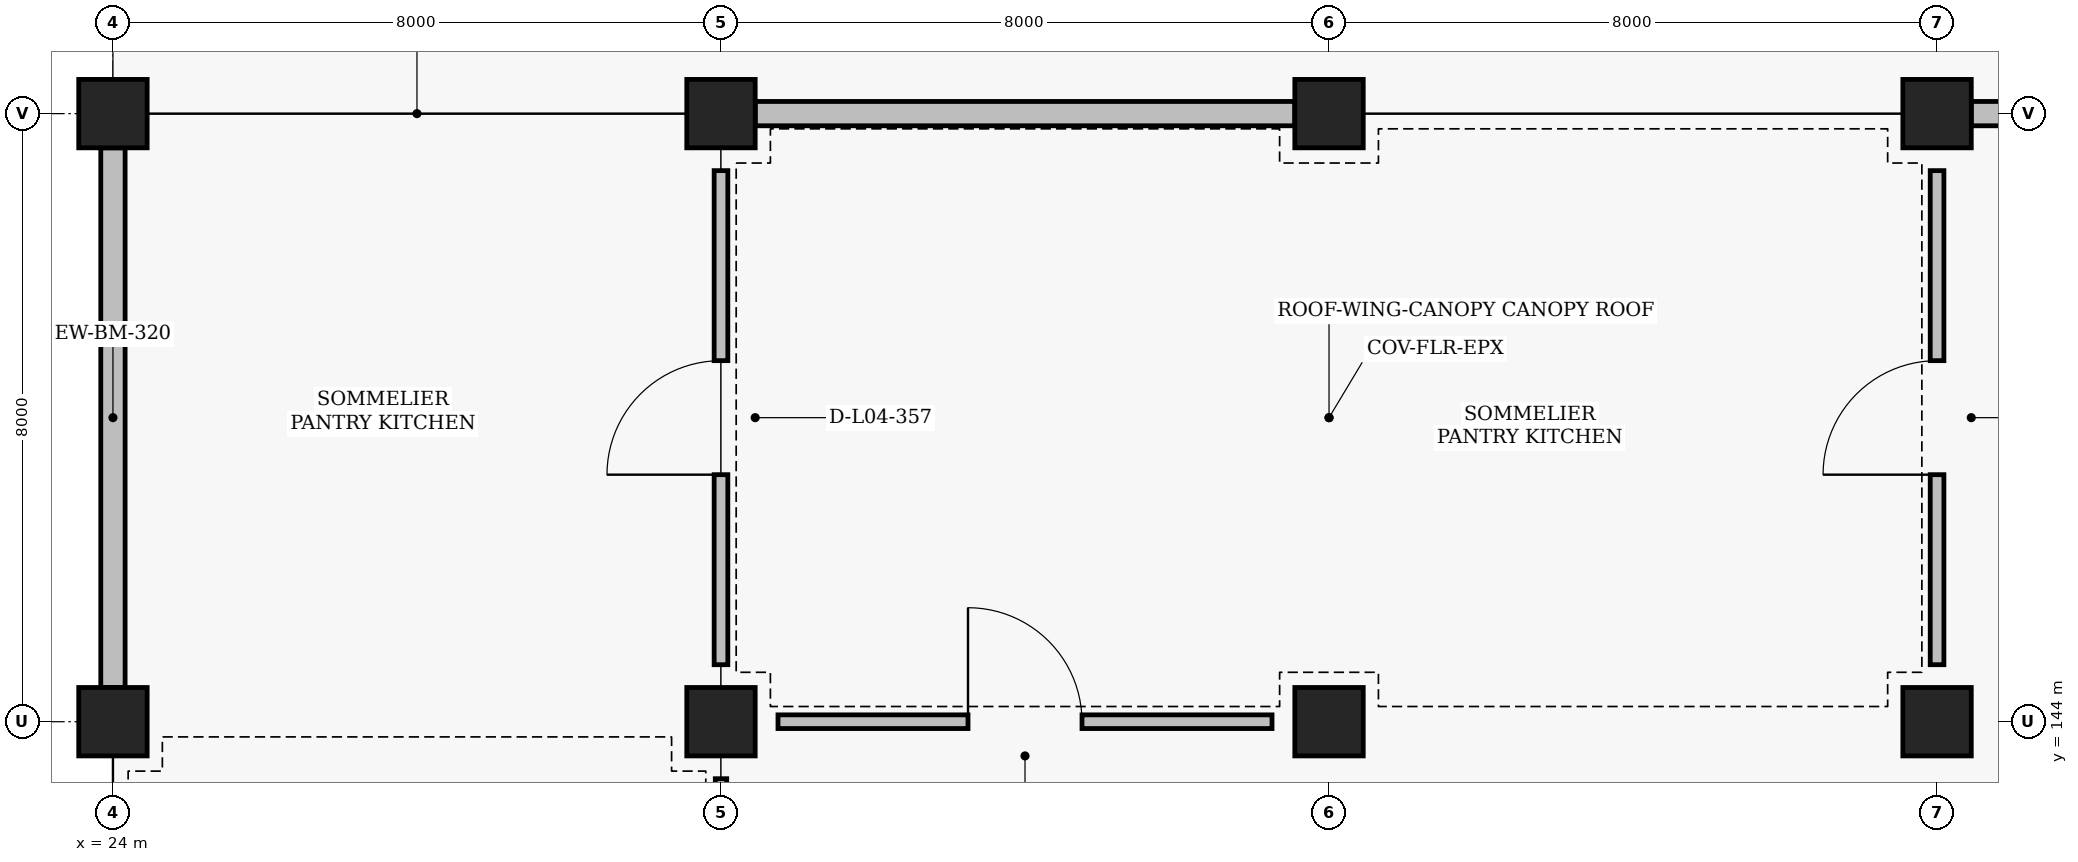
"""IFC4 building model, lengths in metres.
Left out: names, types, materials, properties, quantities, classifications, styles, units other than length and angle.
Written with IfcOpenShell. Run it as: python <this file> out.ifc"""

import sys

from ifc_helpers import new_model, si_unit, direction, frame, frame_2d, origin, origin_2d, place, context, subcontext, project, spatial, rectangle, extrude, element, fill, save


model = new_model("IFC4")
c1 = context("Model", 3, precision=1e-05, world=origin(), true_north=direction((0.0, 1.0)))
c2 = subcontext(c1, "Body", "Model", "MODEL_VIEW")
j1 = project(units=[si_unit("LENGTHUNIT", "METRE"), si_unit("PLANEANGLEUNIT", "RADIAN")], contexts=[c1])
p1 = place(None, origin())
s1 = spatial("IfcSite", under=j1, at=p1, CompositionType="ELEMENT")
p2 = place(p1, origin())
s2 = spatial("IfcBuilding", under=s1, at=p2, CompositionType="ELEMENT")
p3 = place(p2, frame((0.0, 0.0, 14.4)))
s3 = spatial("IfcBuildingStorey", under=s2, at=p3, CompositionType="ELEMENT", Elevation=14.4)
for number, where, z_axis, x_axis in (
    (1, (24.0, 144.0, 0.0), (0.0, 0.0, 1.0), (1.0, 0.0, 0.0)),
    (2, (24.0, 152.0, 0.0), (0.0, 0.0, 1.0), (1.0, 0.0, 0.0)),
    (3, (32.0, 144.0, 0.0), (0.0, 0.0, 1.0), (1.0, 0.0, 0.0)),
    (4, (32.0, 152.0, 0.0), (0.0, 0.0, 1.0), (1.0, 0.0, 0.0)),
    (5, (40.0, 144.0, 0.0), (0.0, 0.0, 1.0), (1.0, 0.0, 0.0)),
    (6, (40.0, 152.0, 0.0), (0.0, 0.0, 1.0), (1.0, 0.0, 0.0)),
    (7, (48.0, 144.0, 0.0), (0.0, 0.0, 1.0), (1.0, 0.0, 0.0)),
    (8, (48.0, 152.0, 0.0), (0.0, 0.0, 1.0), (1.0, 0.0, 0.0)),
):
    element("IfcColumn", number, at=place(p3, frame(where, z_axis=z_axis, x_axis=x_axis)), inside=s3, PredefinedType="COLUMN", context=c2, shape_type="SweptSolid", body=[
        extrude(rectangle(XDim=0.9, YDim=0.9, at=origin_2d()), origin(), (0.0, 0.0, 1.0), 4.2),
    ])
p4 = place(p3, frame((24.0, 144.45, 0.0), z_axis=(0.0, 0.0, 1.0), x_axis=(0.0, 1.0, 0.0)))
e9 = element("IfcWall", 9, at=p4, inside=s3, PredefinedType="SOLIDWALL", context=c2, shape_type="SweptSolid", body=[
    extrude(rectangle(XDim=7.1, YDim=0.32, at=frame_2d((3.55, 0.0))), origin(), (0.0, 0.0, 1.0), 3.33),
])
for number, where, z_axis, x_axis in (
    (10, (32.45, 152.0, 0.0), (0.0, 0.0, 1.0), (1.0, 0.0, 0.0)),
    (11, (48.45, 152.0, 0.0), (0.0, 0.0, 1.0), (1.0, 0.0, 0.0)),
):
    element("IfcWall", number, at=place(p3, frame(where, z_axis=z_axis, x_axis=x_axis)), inside=s3, PredefinedType="SOLIDWALL", context=c2, shape_type="SweptSolid", body=[
        extrude(rectangle(XDim=7.1, YDim=0.32, at=frame_2d((3.55, 0.0))), origin(), (0.0, 0.0, 1.0), 3.35),
    ])
p5 = place(p3, frame((32.0, 144.75, 0.0), z_axis=(0.0, 0.0, 1.0), x_axis=(0.0, 1.0, 0.0)))
e12 = element("IfcWall", 12, at=p5, inside=s3, PredefinedType="PARTITIONING", context=c2, shape_type="SweptSolid", body=[
    extrude(rectangle(XDim=6.5, YDim=0.18, at=frame_2d((3.25, 0.0))), origin(), (0.0, 0.0, 1.0), 3.37),
])
p6 = place(p5, frame((2.5, 0.0, 0.0)))
e13 = element("IfcOpeningElement", 13, at=p6, cuts=e12, PredefinedType="OPENING", context=c2, shape_type="SweptSolid", body=[
    extrude(rectangle(XDim=1.5, YDim=2.2, at=frame_2d((0.75, 1.1))), frame((0.0, 0.1, 0.0), z_axis=(0.0, -1.0, 0.0), x_axis=(1.0, 0.0, 0.0)), (0.0, 0.0, 1.0), 0.2),
])
p7 = place(p3, frame((32.0, 136.75, 0.0), z_axis=(0.0, 0.0, 1.0), x_axis=(0.0, 1.0, 0.0)))
e14 = element("IfcWall", 14, at=p7, inside=s3, PredefinedType="PARTITIONING", context=c2, shape_type="SweptSolid", body=[
    extrude(rectangle(XDim=6.5, YDim=0.15, at=frame_2d((3.25, 0.0))), origin(), (0.0, 0.0, 1.0), 3.33),
])
p8 = place(p7, frame((2.15, 0.0, 0.0)))
e15 = element("IfcOpeningElement", 15, at=p8, cuts=e14, PredefinedType="OPENING", context=c2, shape_type="SweptSolid", body=[
    extrude(rectangle(XDim=2.2, YDim=2.4, at=frame_2d((1.1, 1.2))), frame((0.0, 0.085, 0.0), z_axis=(0.0, -1.0, 0.0), x_axis=(1.0, 0.0, 0.0)), (0.0, 0.0, 1.0), 0.17),
])
p9 = place(p3, frame((32.75, 144.0, 0.0), z_axis=(0.0, 0.0, 1.0), x_axis=(1.0, 0.0, 0.0)))
e16 = element("IfcWall", 16, at=p9, inside=s3, PredefinedType="PARTITIONING", context=c2, shape_type="SweptSolid", body=[
    extrude(rectangle(XDim=6.5, YDim=0.18, at=frame_2d((3.25, 0.0))), origin(), (0.0, 0.0, 1.0), 3.43),
])
p10 = place(p9, frame((2.5, 0.0, 0.0)))
e17 = element("IfcOpeningElement", 17, at=p10, cuts=e16, PredefinedType="OPENING", context=c2, shape_type="SweptSolid", body=[
    extrude(rectangle(XDim=1.5, YDim=2.2, at=frame_2d((0.75, 1.1))), frame((0.0, 0.1, 0.0), z_axis=(0.0, -1.0, 0.0), x_axis=(1.0, 0.0, 0.0)), (0.0, 0.0, 1.0), 0.2),
])
p11 = place(p3, frame((48.0, 144.75, 0.0), z_axis=(0.0, 0.0, 1.0), x_axis=(0.0, 1.0, 0.0)))
e18 = element("IfcWall", 18, at=p11, inside=s3, PredefinedType="PARTITIONING", context=c2, shape_type="SweptSolid", body=[
    extrude(rectangle(XDim=6.5, YDim=0.18, at=frame_2d((3.25, 0.0))), origin(), (0.0, 0.0, 1.0), 3.37),
])
p12 = place(p11, frame((2.5, 0.0, 0.0)))
e19 = element("IfcOpeningElement", 19, at=p12, cuts=e18, PredefinedType="OPENING", context=c2, shape_type="SweptSolid", body=[
    extrude(rectangle(XDim=1.5, YDim=2.2, at=frame_2d((0.75, 1.1))), frame((0.0, 0.1, 0.0), z_axis=(0.0, -1.0, 0.0), x_axis=(1.0, 0.0, 0.0)), (0.0, 0.0, 1.0), 0.2),
])
p13 = place(p6, origin())
e20 = element("IfcDoor", 20, at=p13, inside=s3, OperationType="SINGLE_SWING_LEFT", PredefinedType="DOOR", context=c2, shape_type="SweptSolid", body=[
    extrude(rectangle(XDim=1.5, YDim=2.2, at=frame_2d((0.75, 1.1))), frame((0.0, 0.025, 0.0), z_axis=(0.0, -1.0, 0.0), x_axis=(1.0, 0.0, 0.0)), (0.0, 0.0, 1.0), 0.05),
])
fill(e13, e20)
p14 = place(p10, origin())
e21 = element("IfcDoor", 21, at=p14, inside=s3, OperationType="SINGLE_SWING_LEFT", PredefinedType="DOOR", context=c2, shape_type="SweptSolid", body=[
    extrude(rectangle(XDim=1.5, YDim=2.2, at=frame_2d((0.75, 1.1))), frame((0.0, 0.025, 0.0), z_axis=(0.0, -1.0, 0.0), x_axis=(1.0, 0.0, 0.0)), (0.0, 0.0, 1.0), 0.05),
])
fill(e17, e21)
p15 = place(p12, origin())
e22 = element("IfcDoor", 22, at=p15, inside=s3, OperationType="SINGLE_SWING_LEFT", PredefinedType="DOOR", context=c2, shape_type="SweptSolid", body=[
    extrude(rectangle(XDim=1.5, YDim=2.2, at=frame_2d((0.75, 1.1))), frame((0.0, 0.025, 0.0), z_axis=(0.0, -1.0, 0.0), x_axis=(1.0, 0.0, 0.0)), (0.0, 0.0, 1.0), 0.05),
])
fill(e19, e22)
save(model, sys.argv[1])
